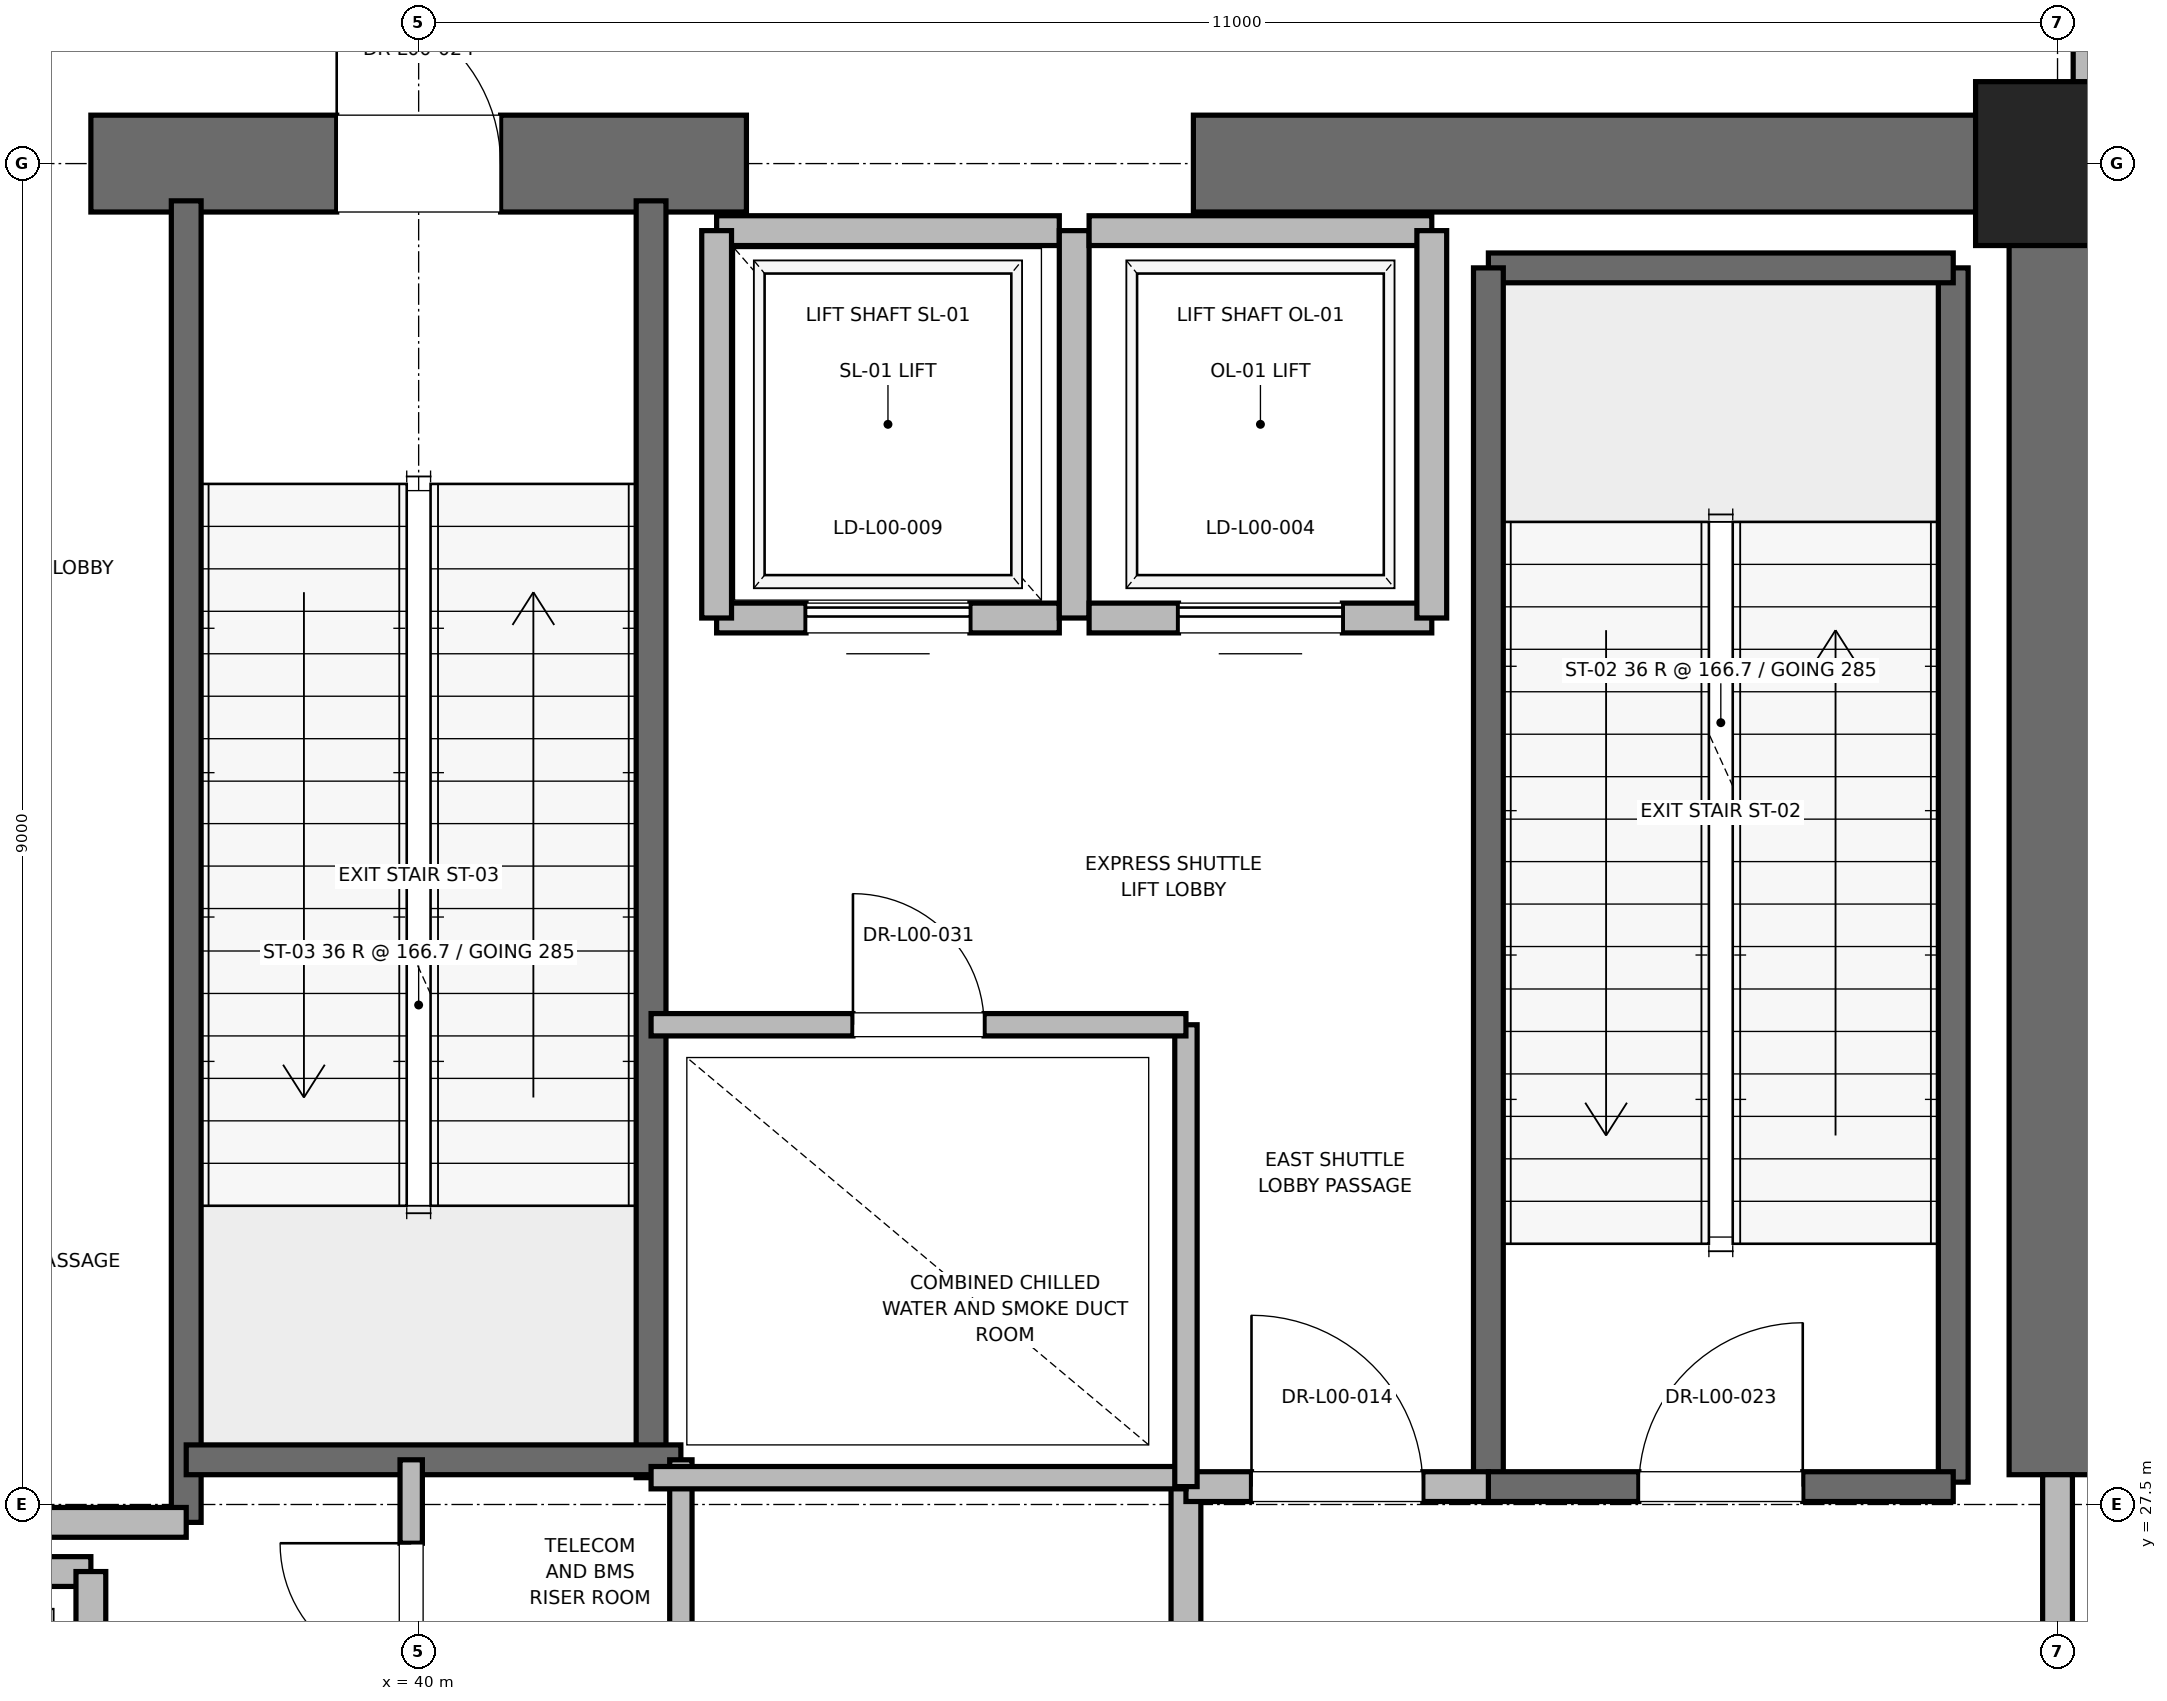
"""IFC4 building model, lengths in metres.
Left out: names, types, materials, properties, quantities, classifications, styles, units other than length and angle.
Written with IfcOpenShell. Run it as: python <this file> out.ifc"""

import sys

from ifc_helpers import new_model, si_unit, direction, frame, frame_2d, origin, origin_2d, place, context, subcontext, project, spatial, rectangle, extrude, element, fill, save


model = new_model("IFC4")
c1 = context("Model", 3, precision=1e-05, world=origin(), true_north=direction((0.0, 1.0)))
c2 = subcontext(c1, "Body", "Model", "MODEL_VIEW")
j1 = project(units=[si_unit("LENGTHUNIT", "METRE"), si_unit("PLANEANGLEUNIT", "RADIAN")], contexts=[c1])
p1 = place(None, origin())
s1 = spatial("IfcSite", under=j1, at=p1, CompositionType="ELEMENT")
p2 = place(p1, origin())
s2 = spatial("IfcBuilding", under=s1, at=p2, CompositionType="ELEMENT")
p3 = place(p2, origin())
s3 = spatial("IfcBuildingStorey", under=s2, at=p3, CompositionType="ELEMENT", Elevation=0.0)
p4 = place(p3, frame((51.0, 36.5, 0.0), z_axis=(0.0, 0.0, 1.0), x_axis=(1.0, 0.0, 0.0)))
e1 = element("IfcColumn", 1, at=p4, inside=s3, PredefinedType="PILASTER", context=c2, shape_type="SweptSolid", body=[
    extrude(rectangle(XDim=1.1, YDim=1.1, at=origin_2d()), origin(), (0.0, 0.0, 1.0), 6.0),
])
p5 = place(p3, frame((37.8, 36.5, 0.0), z_axis=(0.0, 0.0, 1.0), x_axis=(1.0, 0.0, 0.0)))
e2 = element("IfcWall", 2, at=p5, inside=s3, PredefinedType="SHEAR", context=c2, shape_type="SweptSolid", body=[
    extrude(rectangle(XDim=4.4, YDim=0.65, at=frame_2d((2.2, 0.0))), origin(), (0.0, 0.0, 1.0), 5.72),
])
p6 = place(p5, frame((1.65, 0.0, 0.0)))
e3 = element("IfcOpeningElement", 3, at=p6, cuts=e2, PredefinedType="OPENING", context=c2, shape_type="SweptSolid", body=[
    extrude(rectangle(XDim=1.1, YDim=2.15, at=frame_2d((0.55, 1.075))), frame((0.0, 0.325, 0.0), z_axis=(0.0, -1.0, 0.0), x_axis=(1.0, 0.0, 0.0)), (0.0, 0.0, 1.0), 0.65),
])
p7 = place(p3, frame((45.2, 36.5, 0.0), z_axis=(0.0, 0.0, 1.0), x_axis=(1.0, 0.0, 0.0)))
e4 = element("IfcWall", 4, at=p7, inside=s3, PredefinedType="SHEAR", context=c2, shape_type="SweptSolid", body=[
    extrude(rectangle(XDim=5.8, YDim=0.65, at=frame_2d((2.9, 0.0))), origin(), (0.0, 0.0, 1.0), 5.72),
])
p8 = place(p3, frame((51.0, 27.7, 0.0), z_axis=(0.0, 0.0, 1.0), x_axis=(0.0, 1.0, 0.0)))
e5 = element("IfcWall", 5, at=p8, inside=s3, PredefinedType="SHEAR", context=c2, shape_type="SweptSolid", body=[
    extrude(rectangle(XDim=8.8, YDim=0.65, at=frame_2d((4.4, 0.0))), origin(), (0.0, 0.0, 1.0), 5.72),
])
p9 = place(p3, frame((50.3, 27.65, 0.0), z_axis=(0.0, 0.0, 1.0), x_axis=(0.0, 1.0, 0.0)))
e6 = element("IfcWall", 6, at=p9, inside=s3, PredefinedType="SOLIDWALL", context=c2, shape_type="SweptSolid", body=[
    extrude(rectangle(XDim=8.15, YDim=0.2, at=frame_2d((4.075, 0.0))), origin(), (0.0, 0.0, 1.0), 5.72),
])
p10 = place(p3, frame((47.18, 35.8, 0.0), z_axis=(0.0, 0.0, 1.0), x_axis=(1.0, 0.0, 0.0)))
e7 = element("IfcWall", 7, at=p10, inside=s3, PredefinedType="SOLIDWALL", context=c2, shape_type="SweptSolid", body=[
    extrude(rectangle(XDim=3.12, YDim=0.2, at=frame_2d((1.56, 0.0))), origin(), (0.0, 0.0, 1.0), 5.72),
])
p11 = place(p3, frame((47.18, 27.62, 0.0), z_axis=(0.0, 0.0, 1.0), x_axis=(0.0, 1.0, 0.0)))
e8 = element("IfcWall", 8, at=p11, inside=s3, PredefinedType="SOLIDWALL", context=c2, shape_type="SweptSolid", body=[
    extrude(rectangle(XDim=8.18, YDim=0.2, at=frame_2d((4.09, 0.0))), origin(), (0.0, 0.0, 1.0), 5.72),
])
p12 = place(p3, frame((47.18, 27.62, 0.0), z_axis=(0.0, 0.0, 1.0), x_axis=(1.0, 0.0, 0.0)))
e9 = element("IfcWall", 9, at=p12, inside=s3, PredefinedType="SOLIDWALL", context=c2, shape_type="SweptSolid", body=[
    extrude(rectangle(XDim=3.12, YDim=0.2, at=frame_2d((1.56, 0.0))), origin(), (0.0, 0.0, 1.0), 5.72),
])
p13 = place(p12, frame((1.01, 0.0, 0.0)))
e10 = element("IfcOpeningElement", 10, at=p13, cuts=e9, PredefinedType="OPENING", context=c2, shape_type="SweptSolid", body=[
    extrude(rectangle(XDim=1.1, YDim=2.15, at=frame_2d((0.55, 1.075))), frame((0.0, 0.1, 0.0), z_axis=(0.0, -1.0, 0.0), x_axis=(1.0, 0.0, 0.0)), (0.0, 0.0, 1.0), 0.2),
])
p14 = place(p3, frame((38.44, 27.38, 0.0), z_axis=(0.0, 0.0, 1.0), x_axis=(0.0, 1.0, 0.0)))
e11 = element("IfcWall", 11, at=p14, inside=s3, PredefinedType="SOLIDWALL", context=c2, shape_type="SweptSolid", body=[
    extrude(rectangle(XDim=8.87, YDim=0.2, at=frame_2d((4.435, 0.0))), origin(), (0.0, 0.0, 1.0), 5.72),
])
p15 = place(p3, frame((41.56, 27.68, 0.0), z_axis=(0.0, 0.0, 1.0), x_axis=(0.0, 1.0, 0.0)))
e12 = element("IfcWall", 12, at=p15, inside=s3, PredefinedType="SOLIDWALL", context=c2, shape_type="SweptSolid", body=[
    extrude(rectangle(XDim=8.57, YDim=0.2, at=frame_2d((4.285, 0.0))), origin(), (0.0, 0.0, 1.0), 5.72),
])
p16 = place(p3, frame((38.44, 27.8, 0.0), z_axis=(0.0, 0.0, 1.0), x_axis=(1.0, 0.0, 0.0)))
e13 = element("IfcWall", 13, at=p16, inside=s3, PredefinedType="SOLIDWALL", context=c2, shape_type="SweptSolid", body=[
    extrude(rectangle(XDim=3.32, YDim=0.2, at=frame_2d((1.66, 0.0))), origin(), (0.0, 0.0, 1.0), 5.72),
])
p17 = place(p3, frame((32.82, 27.38, 0.0), z_axis=(0.0, 0.0, 1.0), x_axis=(1.0, 0.0, 0.0)))
e14 = element("IfcWall", 14, at=p17, inside=s3, PredefinedType="PARTITIONING", context=c2, shape_type="SweptSolid", body=[
    extrude(rectangle(XDim=5.62, YDim=0.2, at=frame_2d((2.81, 0.0))), origin(), (0.0, 0.0, 1.0), 5.72),
])
p18 = place(p3, frame((45.15, 24.25, 0.0), z_axis=(0.0, 0.0, 1.0), x_axis=(0.0, 1.0, 0.0)))
e15 = element("IfcWall", 15, at=p18, inside=s3, PredefinedType="PARTITIONING", context=c2, shape_type="SweptSolid", body=[
    extrude(rectangle(XDim=3.37, YDim=0.2, at=frame_2d((1.685, 0.0))), origin(), (0.0, 0.0, 1.0), 5.72),
])
p19 = place(p3, frame((45.15, 27.62, 0.0), z_axis=(0.0, 0.0, 1.0), x_axis=(1.0, 0.0, 0.0)))
e16 = element("IfcWall", 16, at=p19, inside=s3, PredefinedType="PARTITIONING", context=c2, shape_type="SweptSolid", body=[
    extrude(rectangle(XDim=2.03, YDim=0.2, at=frame_2d((1.015, 0.0))), origin(), (0.0, 0.0, 1.0), 5.72),
])
p20 = place(p19, frame((0.44, 0.0, 0.0)))
e17 = element("IfcOpeningElement", 17, at=p20, cuts=e16, PredefinedType="OPENING", context=c2, shape_type="SweptSolid", body=[
    extrude(rectangle(XDim=1.15, YDim=2.2, at=frame_2d((0.575, 1.1))), frame((0.0, 0.1, 0.0), z_axis=(0.0, -1.0, 0.0), x_axis=(1.0, 0.0, 0.0)), (0.0, 0.0, 1.0), 0.2),
])
p21 = place(p3, frame((51.0, 27.7, 0.0), z_axis=(0.0, 0.0, 1.0), x_axis=(0.0, -1.0, 0.0)))
e18 = element("IfcWall", 18, at=p21, inside=s3, PredefinedType="PARTITIONING", context=c2, shape_type="SweptSolid", body=[
    extrude(rectangle(XDim=3.4, YDim=0.2, at=frame_2d((1.7, 0.0))), origin(), (0.0, 0.0, 1.0), 4.5),
])
p22 = place(p21, frame((1.125, 0.0, 0.0)))
e19 = element("IfcOpeningElement", 19, at=p22, cuts=e18, PredefinedType="OPENING", context=c2, shape_type="SweptSolid", body=[
    extrude(rectangle(XDim=1.15, YDim=2.2, at=frame_2d((0.575, 1.1))), frame((0.0, 0.1, 0.0), z_axis=(0.0, -1.0, 0.0), x_axis=(1.0, 0.0, 0.0)), (0.0, 0.0, 1.0), 0.2),
])
p23 = place(p3, frame((37.8, 27.05, 0.0), z_axis=(0.0, 0.0, 1.0), x_axis=(-1.0, 0.0, 0.0)))
e20 = element("IfcWall", 20, at=p23, inside=s3, PredefinedType="SOLIDWALL", context=c2, shape_type="SweptSolid", body=[
    extrude(rectangle(XDim=2.3, YDim=0.2, at=frame_2d((1.15, 0.0))), origin(), (0.0, 0.0, 1.0), 5.72),
])
p24 = place(p3, frame((37.8, 24.45, 0.0), z_axis=(0.0, 0.0, 1.0), x_axis=(0.0, 1.0, 0.0)))
e21 = element("IfcWall", 21, at=p24, inside=s3, PredefinedType="SOLIDWALL", context=c2, shape_type="SweptSolid", body=[
    extrude(rectangle(XDim=2.6, YDim=0.2, at=frame_2d((1.3, 0.0))), origin(), (0.0, 0.0, 1.0), 5.72),
])
p25 = place(p3, frame((42.0, 33.45, 0.0), z_axis=(0.0, 0.0, 1.0), x_axis=(1.0, 0.0, 0.0)))
e22 = element("IfcWall", 22, at=p25, inside=s3, PredefinedType="SOLIDWALL", context=c2, shape_type="SweptSolid", body=[
    extrude(rectangle(XDim=2.3, YDim=0.2, at=frame_2d((1.15, 0.0))), origin(), (0.0, 0.0, 1.0), 5.72),
])
p26 = place(p25, frame((0.6, 0.0, 0.0)))
e23 = element("IfcOpeningElement", 23, at=p26, cuts=e22, PredefinedType="OPENING", context=c2, shape_type="SweptSolid", body=[
    extrude(rectangle(XDim=1.1, YDim=2.2, at=frame_2d((0.55, 1.1))), frame((0.0, 0.1, 0.0), z_axis=(0.0, -1.0, 0.0), x_axis=(1.0, 0.0, 0.0)), (0.0, 0.0, 1.0), 0.2),
])
p27 = place(p3, frame((44.3, 36.05, 0.0), z_axis=(0.0, 0.0, 1.0), x_axis=(-1.0, 0.0, 0.0)))
e24 = element("IfcWall", 24, at=p27, inside=s3, PredefinedType="SOLIDWALL", context=c2, shape_type="SweptSolid", body=[
    extrude(rectangle(XDim=2.3, YDim=0.2, at=frame_2d((1.15, 0.0))), origin(), (0.0, 0.0, 1.0), 4.5),
])
for number, where, z_axis, x_axis in (
    (25, (42.0, 36.05, 0.0), (0.0, 0.0, 1.0), (0.0, -1.0, 0.0)),
    (26, (44.4, 33.45, 0.0), (0.0, 0.0, 1.0), (0.0, 1.0, 0.0)),
):
    element("IfcWall", number, at=place(p3, frame(where, z_axis=z_axis, x_axis=x_axis)), inside=s3, PredefinedType="SOLIDWALL", context=c2, shape_type="SweptSolid", body=[
        extrude(rectangle(XDim=2.6, YDim=0.2, at=frame_2d((1.3, 0.0))), origin(), (0.0, 0.0, 1.0), 4.5),
    ])
p28 = place(p3, frame((44.5, 33.45, 0.0), z_axis=(0.0, 0.0, 1.0), x_axis=(1.0, 0.0, 0.0)))
e27 = element("IfcWall", 27, at=p28, inside=s3, PredefinedType="SOLIDWALL", context=c2, shape_type="SweptSolid", body=[
    extrude(rectangle(XDim=2.3, YDim=0.2, at=frame_2d((1.15, 0.0))), origin(), (0.0, 0.0, 1.0), 5.72),
])
p29 = place(p28, frame((0.6, 0.0, 0.0)))
e28 = element("IfcOpeningElement", 28, at=p29, cuts=e27, PredefinedType="OPENING", context=c2, shape_type="SweptSolid", body=[
    extrude(rectangle(XDim=1.1, YDim=2.2, at=frame_2d((0.55, 1.1))), frame((0.0, 0.1, 0.0), z_axis=(0.0, -1.0, 0.0), x_axis=(1.0, 0.0, 0.0)), (0.0, 0.0, 1.0), 0.2),
])
p30 = place(p3, frame((46.8, 36.05, 0.0), z_axis=(0.0, 0.0, 1.0), x_axis=(-1.0, 0.0, 0.0)))
e29 = element("IfcWall", 29, at=p30, inside=s3, PredefinedType="SOLIDWALL", context=c2, shape_type="SweptSolid", body=[
    extrude(rectangle(XDim=2.3, YDim=0.2, at=frame_2d((1.15, 0.0))), origin(), (0.0, 0.0, 1.0), 4.5),
])
p31 = place(p3, frame((46.8, 33.45, 0.0), z_axis=(0.0, 0.0, 1.0), x_axis=(0.0, 1.0, 0.0)))
e30 = element("IfcWall", 30, at=p31, inside=s3, PredefinedType="SOLIDWALL", context=c2, shape_type="SweptSolid", body=[
    extrude(rectangle(XDim=2.6, YDim=0.2, at=frame_2d((1.3, 0.0))), origin(), (0.0, 0.0, 1.0), 5.72),
])
p32 = place(p3, frame((41.76, 23.8, 0.0), z_axis=(0.0, 0.0, 1.0), x_axis=(0.0, 1.0, 0.0)))
e31 = element("IfcWall", 31, at=p32, inside=s3, PredefinedType="PARTITIONING", context=c2, shape_type="SweptSolid", body=[
    extrude(rectangle(XDim=4.0, YDim=0.15, at=frame_2d((2.0, 0.0))), origin(), (0.0, 0.0, 1.0), 2.85),
])
p33 = place(p3, frame((39.95, 25.8, 0.0), z_axis=(0.0, 0.0, 1.0), x_axis=(0.0, 1.0, 0.0)))
e32 = element("IfcWall", 32, at=p33, inside=s3, PredefinedType="PARTITIONING", context=c2, shape_type="SweptSolid", body=[
    extrude(rectangle(XDim=2.0, YDim=0.15, at=frame_2d((1.0, 0.0))), origin(), (0.0, 0.0, 1.0), 2.85),
])
p34 = place(p33, frame((0.56, 0.0, 0.0)))
e33 = element("IfcOpeningElement", 33, at=p34, cuts=e32, PredefinedType="OPENING", context=c2, shape_type="SweptSolid", body=[
    extrude(rectangle(XDim=0.88, YDim=2.1, at=frame_2d((0.44, 1.05))), frame((0.0, 0.075, 0.0), z_axis=(0.0, -1.0, 0.0), x_axis=(1.0, 0.0, 0.0)), (0.0, 0.0, 1.0), 0.15),
])
p35 = place(p3, frame((41.56, 27.68, 0.0), z_axis=(0.0, 0.0, 1.0), x_axis=(1.0, 0.0, 0.0)))
e34 = element("IfcWall", 34, at=p35, inside=s3, PredefinedType="PARTITIONING", context=c2, shape_type="SweptSolid", body=[
    extrude(rectangle(XDim=3.59, YDim=0.15, at=frame_2d((1.795, 0.0))), origin(), (0.0, 0.0, 1.0), 2.85),
])
p36 = place(p3, frame((45.15, 27.62, 0.0), z_axis=(0.0, 0.0, 1.0), x_axis=(0.0, 1.0, 0.0)))
e35 = element("IfcWall", 35, at=p36, inside=s3, PredefinedType="PARTITIONING", context=c2, shape_type="SweptSolid", body=[
    extrude(rectangle(XDim=3.1, YDim=0.15, at=frame_2d((1.55, 0.0))), origin(), (0.0, 0.0, 1.0), 2.85),
])
p37 = place(p3, frame((41.56, 30.72, 0.0), z_axis=(0.0, 0.0, 1.0), x_axis=(1.0, 0.0, 0.0)))
e36 = element("IfcWall", 36, at=p37, inside=s3, PredefinedType="PARTITIONING", context=c2, shape_type="SweptSolid", body=[
    extrude(rectangle(XDim=3.59, YDim=0.15, at=frame_2d((1.795, 0.0))), origin(), (0.0, 0.0, 1.0), 2.85),
])
p38 = place(p37, frame((1.355, 0.0, 0.0)))
e37 = element("IfcOpeningElement", 37, at=p38, cuts=e36, PredefinedType="OPENING", context=c2, shape_type="SweptSolid", body=[
    extrude(rectangle(XDim=0.88, YDim=2.1, at=frame_2d((0.44, 1.05))), frame((0.0, 0.075, 0.0), z_axis=(0.0, -1.0, 0.0), x_axis=(1.0, 0.0, 0.0)), (0.0, 0.0, 1.0), 0.15),
])
p39 = place(p3, frame((51.18, 39.35, 0.0), z_axis=(0.0, 0.0, 1.0), x_axis=(0.0, -1.0, 0.0)))
e38 = element("IfcWall", 38, at=p39, inside=s3, PredefinedType="PARTITIONING", context=c2, shape_type="SweptSolid", body=[
    extrude(rectangle(XDim=2.75, YDim=0.15, at=frame_2d((1.375, 0.0))), origin(), (0.0, 0.0, 1.0), 2.85),
])
p40 = place(p39, frame((0.8, 0.0, 0.0)))
e39 = element("IfcOpeningElement", 39, at=p40, cuts=e38, PredefinedType="OPENING", context=c2, shape_type="SweptSolid", body=[
    extrude(rectangle(XDim=1.15, YDim=2.2, at=frame_2d((0.575, 1.1))), frame((0.0, 0.075, 0.0), z_axis=(0.0, -1.0, 0.0), x_axis=(1.0, 0.0, 0.0)), (0.0, 0.0, 1.0), 0.15),
])
p41 = place(p13, origin())
e40 = element("IfcDoor", 40, at=p41, inside=s3, OperationType="SINGLE_SWING_RIGHT", PredefinedType="DOOR", context=c2, shape_type="SweptSolid", body=[
    extrude(rectangle(XDim=1.1, YDim=2.15, at=frame_2d((0.55, 1.075))), frame((0.0, 0.025, 0.0), z_axis=(0.0, -1.0, 0.0), x_axis=(1.0, 0.0, 0.0)), (0.0, 0.0, 1.0), 0.05),
])
fill(e10, e40)
p42 = place(p6, origin())
e41 = element("IfcDoor", 41, at=p42, inside=s3, OperationType="SINGLE_SWING_LEFT", PredefinedType="DOOR", context=c2, shape_type="SweptSolid", body=[
    extrude(rectangle(XDim=1.1, YDim=2.15, at=frame_2d((0.55, 1.075))), frame((0.0, 0.025, 0.0), z_axis=(0.0, -1.0, 0.0), x_axis=(1.0, 0.0, 0.0)), (0.0, 0.0, 1.0), 0.05),
])
fill(e3, e41)
p43 = place(p20, origin())
e42 = element("IfcDoor", 42, at=p43, inside=s3, OperationType="SINGLE_SWING_LEFT", PredefinedType="DOOR", context=c2, shape_type="SweptSolid", body=[
    extrude(rectangle(XDim=1.15, YDim=2.2, at=frame_2d((0.575, 1.1))), frame((0.0, 0.025, 0.0), z_axis=(0.0, -1.0, 0.0), x_axis=(1.0, 0.0, 0.0)), (0.0, 0.0, 1.0), 0.05),
])
fill(e17, e42)
p44 = place(p26, origin())
e43 = element("IfcDoor", 43, at=p44, inside=s3, OperationType="SLIDING_TO_RIGHT", PredefinedType="DOOR", context=c2, shape_type="SweptSolid", body=[
    extrude(rectangle(XDim=1.1, YDim=2.2, at=frame_2d((0.55, 1.1))), frame((0.0, 0.025, 0.0), z_axis=(0.0, -1.0, 0.0), x_axis=(1.0, 0.0, 0.0)), (0.0, 0.0, 1.0), 0.05),
])
fill(e23, e43)
p45 = place(p29, origin())
e44 = element("IfcDoor", 44, at=p45, inside=s3, OperationType="SLIDING_TO_RIGHT", PredefinedType="DOOR", context=c2, shape_type="SweptSolid", body=[
    extrude(rectangle(XDim=1.1, YDim=2.2, at=frame_2d((0.55, 1.1))), frame((0.0, 0.025, 0.0), z_axis=(0.0, -1.0, 0.0), x_axis=(1.0, 0.0, 0.0)), (0.0, 0.0, 1.0), 0.05),
])
fill(e28, e44)
p46 = place(p34, origin())
e45 = element("IfcDoor", 45, at=p46, inside=s3, OperationType="SINGLE_SWING_RIGHT", PredefinedType="DOOR", context=c2, shape_type="SweptSolid", body=[
    extrude(rectangle(XDim=0.88, YDim=2.1, at=frame_2d((0.44, 1.05))), frame((0.0, 0.025, 0.0), z_axis=(0.0, -1.0, 0.0), x_axis=(1.0, 0.0, 0.0)), (0.0, 0.0, 1.0), 0.05),
])
fill(e33, e45)
p47 = place(p38, origin())
e46 = element("IfcDoor", 46, at=p47, inside=s3, OperationType="SINGLE_SWING_LEFT", PredefinedType="DOOR", context=c2, shape_type="SweptSolid", body=[
    extrude(rectangle(XDim=0.88, YDim=2.1, at=frame_2d((0.44, 1.05))), frame((0.0, 0.025, 0.0), z_axis=(0.0, -1.0, 0.0), x_axis=(1.0, 0.0, 0.0)), (0.0, 0.0, 1.0), 0.05),
])
fill(e37, e46)
save(model, sys.argv[1])
